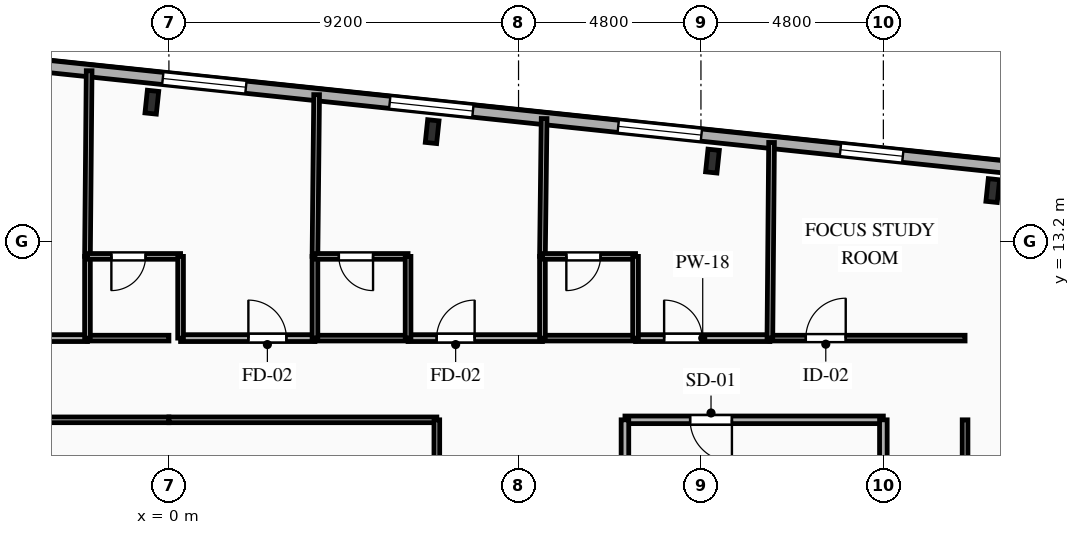
"""IFC4 building model, lengths in metres.
Left out: names, types, materials, properties, quantities, classifications, styles, units other than length and angle.
Written with IfcOpenShell. Run it as: python <this file> out.ifc"""

import sys

from ifc_helpers import new_model, si_unit, direction, frame, frame_2d, origin, origin_2d, place, context, subcontext, project, spatial, rectangle, i_section, extrude, element, fill, save


model = new_model("IFC4")
c1 = context("Model", 3, precision=1e-05, world=origin(), true_north=direction((0.0, 1.0)))
c2 = subcontext(c1, "Body", "Model", "MODEL_VIEW")
j1 = project(units=[si_unit("LENGTHUNIT", "METRE"), si_unit("PLANEANGLEUNIT", "RADIAN")], contexts=[c1])
p1 = place(None, origin())
s1 = spatial("IfcSite", under=j1, at=p1, CompositionType="ELEMENT")
p2 = place(p1, origin())
s2 = spatial("IfcBuilding", under=s1, at=p2, CompositionType="ELEMENT")
p3 = place(p2, frame((0.0, 0.0, 189.7)))
s3 = spatial("IfcBuildingStorey", under=s2, at=p3, CompositionType="ELEMENT", Elevation=189.7)
for number, where, z_axis, x_axis in (
    (1, (21.679, 14.532, 0.0), (0.0, 0.0, 1.0), (0.995, -0.105, 0.0)),
    (2, (14.303, 15.308, 0.0), (0.0, 0.0, 1.0), (0.995, -0.105, 0.0)),
    (3, (6.927, 16.083, 0.0), (0.0, 0.0, 1.0), (0.995, -0.105, 0.0)),
    (4, (-0.449, 16.858, 0.0), (0.0, 0.0, 1.0), (0.995, -0.105, 0.0)),
):
    element("IfcColumn", number, at=place(p3, frame(where, z_axis=z_axis, x_axis=x_axis)), inside=s3, PredefinedType="COLUMN", context=c2, shape_type="SweptSolid", body=[
        extrude(i_section(OverallWidth=0.3, OverallDepth=0.6, WebThickness=0.015, FlangeThickness=0.03, FilletRadius=0.027, at=origin_2d()), origin(), (0.0, 0.0, 1.0), 3.35),
    ])
p4 = place(p3, frame((-23.156, 19.898, 0.0), z_axis=(0.0, 0.0, 1.0), x_axis=(0.994522001802, -0.104527450613, 0.0)))
e5 = element("IfcWall", 5, at=p4, inside=s3, PredefinedType="SOLIDWALL", context=c2, shape_type="SweptSolid", body=[
    extrude(rectangle(XDim=45.8, YDim=0.32, at=frame_2d((22.9, 0.0))), origin(), (0.0, 0.0, 1.0), 3.04),
])
p5 = place(p4, frame((4.94, 0.0, 0.85)))
e6 = element("IfcOpeningElement", 6, at=p5, cuts=e5, PredefinedType="OPENING", context=c2, shape_type="SweptSolid", body=[
    extrude(rectangle(XDim=1.65, YDim=1.85, at=frame_2d((0.825, 0.925))), frame((0.0, 0.17, 0.0), z_axis=(0.0, -1.0, 0.0), x_axis=(1.0, 0.0, 0.0)), (0.0, 0.0, 1.0), 0.34),
])
p6 = place(p4, frame((12.572, 0.0, 0.85)))
e7 = element("IfcOpeningElement", 7, at=p6, cuts=e5, PredefinedType="OPENING", context=c2, shape_type="SweptSolid", body=[
    extrude(rectangle(XDim=1.6, YDim=1.85, at=frame_2d((0.8, 0.925))), frame((0.0, 0.17, 0.0), z_axis=(0.0, -1.0, 0.0), x_axis=(1.0, 0.0, 0.0)), (0.0, 0.0, 1.0), 0.34),
])
p7 = place(p4, frame((17.116, 0.0, 0.85)))
e8 = element("IfcOpeningElement", 8, at=p7, cuts=e5, PredefinedType="OPENING", context=c2, shape_type="SweptSolid", body=[
    extrude(rectangle(XDim=2.2, YDim=1.85, at=frame_2d((1.1, 0.925))), frame((0.0, 0.17, 0.0), z_axis=(0.0, -1.0, 0.0), x_axis=(1.0, 0.0, 0.0)), (0.0, 0.0, 1.0), 0.34),
])
p8 = place(p4, frame((23.121, 0.0, 0.85)))
e9 = element("IfcOpeningElement", 9, at=p8, cuts=e5, PredefinedType="OPENING", context=c2, shape_type="SweptSolid", body=[
    extrude(rectangle(XDim=2.2, YDim=1.85, at=frame_2d((1.1, 0.925))), frame((0.0, 0.17, 0.0), z_axis=(0.0, -1.0, 0.0), x_axis=(1.0, 0.0, 0.0)), (0.0, 0.0, 1.0), 0.34),
])
p9 = place(p4, frame((29.126, 0.0, 0.85)))
e10 = element("IfcOpeningElement", 10, at=p9, cuts=e5, PredefinedType="OPENING", context=c2, shape_type="SweptSolid", body=[
    extrude(rectangle(XDim=2.2, YDim=1.85, at=frame_2d((1.1, 0.925))), frame((0.0, 0.17, 0.0), z_axis=(0.0, -1.0, 0.0), x_axis=(1.0, 0.0, 0.0)), (0.0, 0.0, 1.0), 0.34),
])
p10 = place(p4, frame((35.172, 0.0, 0.85)))
e11 = element("IfcOpeningElement", 11, at=p10, cuts=e5, PredefinedType="OPENING", context=c2, shape_type="SweptSolid", body=[
    extrude(rectangle(XDim=2.2, YDim=1.85, at=frame_2d((1.1, 0.925))), frame((0.0, 0.17, 0.0), z_axis=(0.0, -1.0, 0.0), x_axis=(1.0, 0.0, 0.0)), (0.0, 0.0, 1.0), 0.34),
])
p11 = place(p4, frame((41.052, 0.0, 0.85)))
e12 = element("IfcOpeningElement", 12, at=p11, cuts=e5, PredefinedType="OPENING", context=c2, shape_type="SweptSolid", body=[
    extrude(rectangle(XDim=1.65, YDim=1.85, at=frame_2d((0.825, 0.925))), frame((0.0, 0.17, 0.0), z_axis=(0.0, -1.0, 0.0), x_axis=(1.0, 0.0, 0.0)), (0.0, 0.0, 1.0), 0.34),
])
p12 = place(p3, frame((18.8, 8.5, 0.0), z_axis=(0.0, 0.0, 1.0), x_axis=(-1.0, 0.0, 0.0)))
e13 = element("IfcWall", 13, at=p12, inside=s3, PredefinedType="PARTITIONING", context=c2, shape_type="SweptSolid", body=[
    extrude(rectangle(XDim=6.8, YDim=0.2, at=frame_2d((3.4, 0.0))), origin(), (0.0, 0.0, 1.0), 3.04),
])
p13 = place(p12, frame((3.985, 0.0, 0.0)))
e14 = element("IfcOpeningElement", 14, at=p13, cuts=e13, PredefinedType="OPENING", context=c2, shape_type="SweptSolid", body=[
    extrude(rectangle(XDim=1.1, YDim=2.15, at=frame_2d((0.55, 1.075))), frame((0.0, 0.11, 0.0), z_axis=(0.0, -1.0, 0.0), x_axis=(1.0, 0.0, 0.0)), (0.0, 0.0, 1.0), 0.22),
])
p14 = place(p3, frame((18.8, 5.6, 0.0), z_axis=(0.0, 0.0, 1.0), x_axis=(0.0, 1.0, 0.0)))
e15 = element("IfcWall", 15, at=p14, inside=s3, PredefinedType="PARTITIONING", context=c2, shape_type="SweptSolid", body=[
    extrude(rectangle(XDim=2.9, YDim=0.2, at=frame_2d((1.45, 0.0))), origin(), (0.0, 0.0, 1.0), 2.665),
])
p15 = place(p3, frame((12.0, 8.5, 0.0), z_axis=(0.0, 0.0, 1.0), x_axis=(0.0, -1.0, 0.0)))
e16 = element("IfcWall", 16, at=p15, inside=s3, PredefinedType="PARTITIONING", context=c2, shape_type="SweptSolid", body=[
    extrude(rectangle(XDim=2.9, YDim=0.2, at=frame_2d((1.45, 0.0))), origin(), (0.0, 0.0, 1.0), 3.04),
])
p16 = place(p3, frame((-5.679, 10.65, 0.0), z_axis=(0.0, 0.0, 1.0), x_axis=(1.0, 0.0, 0.0)))
e17 = element("IfcWall", 17, at=p16, inside=s3, PredefinedType="PARTITIONING", context=c2, shape_type="SweptSolid", body=[
    extrude(rectangle(XDim=3.536, YDim=0.18, at=frame_2d((1.768, 0.0))), origin(), (0.0, 0.0, 1.0), 3.04),
])
p17 = place(p16, frame((1.268, 0.0, 0.0)))
e18 = element("IfcOpeningElement", 18, at=p17, cuts=e17, PredefinedType="OPENING", context=c2, shape_type="SweptSolid", body=[
    extrude(rectangle(XDim=1.0, YDim=2.15, at=frame_2d((0.5, 1.075))), frame((0.0, 0.1, 0.0), z_axis=(0.0, -1.0, 0.0), x_axis=(1.0, 0.0, 0.0)), (0.0, 0.0, 1.0), 0.2),
])
p18 = place(p3, frame((-2.143, 10.65, 0.0), z_axis=(0.0, 0.0, 1.0), x_axis=(1.0, 0.0, 0.0)))
e19 = element("IfcWall", 19, at=p18, inside=s3, PredefinedType="PLUMBINGWALL", context=c2, shape_type="SweptSolid", body=[
    extrude(rectangle(XDim=2.143, YDim=0.15, at=frame_2d((1.072, 0.0))), origin(), (0.0, 0.0, 1.0), 3.04),
])
p19 = place(p3, frame((0.0, 8.5, 0.0), z_axis=(0.0, 0.0, 1.0), x_axis=(-1.0, 0.0, 0.0)))
e20 = element("IfcWall", 20, at=p19, inside=s3, PredefinedType="PARTITIONING", context=c2, shape_type="SweptSolid", body=[
    extrude(rectangle(XDim=7.05, YDim=0.15, at=frame_2d((3.525, 0.0))), origin(), (0.0, 0.0, 1.0), 3.04),
])
p20 = place(p3, frame((0.307, 10.65, 0.0), z_axis=(0.0, 0.0, 1.0), x_axis=(1.0, 0.0, 0.0)))
e21 = element("IfcWall", 21, at=p20, inside=s3, PredefinedType="PARTITIONING", context=c2, shape_type="SweptSolid", body=[
    extrude(rectangle(XDim=3.536, YDim=0.18, at=frame_2d((1.768, 0.0))), origin(), (0.0, 0.0, 1.0), 3.04),
])
p21 = place(p20, frame((1.784, 0.0, 0.0)))
e22 = element("IfcOpeningElement", 22, at=p21, cuts=e21, PredefinedType="OPENING", context=c2, shape_type="SweptSolid", body=[
    extrude(rectangle(XDim=1.0, YDim=2.15, at=frame_2d((0.5, 1.075))), frame((0.0, 0.1, 0.0), z_axis=(0.0, -1.0, 0.0), x_axis=(1.0, 0.0, 0.0)), (0.0, 0.0, 1.0), 0.2),
])
p22 = place(p3, frame((6.293, 10.65, 0.0), z_axis=(0.0, 0.0, 1.0), x_axis=(1.0, 0.0, 0.0)))
e23 = element("IfcWall", 23, at=p22, inside=s3, PredefinedType="PARTITIONING", context=c2, shape_type="SweptSolid", body=[
    extrude(rectangle(XDim=3.536, YDim=0.18, at=frame_2d((1.768, 0.0))), origin(), (0.0, 0.0, 1.0), 3.04),
])
p23 = place(p22, frame((0.752, 0.0, 0.0)))
e24 = element("IfcOpeningElement", 24, at=p23, cuts=e23, PredefinedType="OPENING", context=c2, shape_type="SweptSolid", body=[
    extrude(rectangle(XDim=1.0, YDim=2.15, at=frame_2d((0.5, 1.075))), frame((0.0, 0.1, 0.0), z_axis=(0.0, -1.0, 0.0), x_axis=(1.0, 0.0, 0.0)), (0.0, 0.0, 1.0), 0.2),
])
p24 = place(p3, frame((3.843, 10.65, 0.0), z_axis=(0.0, 0.0, 1.0), x_axis=(1.0, 0.0, 0.0)))
e25 = element("IfcWall", 25, at=p24, inside=s3, PredefinedType="PLUMBINGWALL", context=c2, shape_type="SweptSolid", body=[
    extrude(rectangle(XDim=2.45, YDim=0.15, at=frame_2d((1.225, 0.0))), origin(), (0.0, 0.0, 1.0), 3.04),
])
p25 = place(p3, frame((12.279, 10.65, 0.0), z_axis=(0.0, 0.0, 1.0), x_axis=(1.0, 0.0, 0.0)))
e26 = element("IfcWall", 26, at=p25, inside=s3, PredefinedType="PARTITIONING", context=c2, shape_type="SweptSolid", body=[
    extrude(rectangle(XDim=3.535, YDim=0.18, at=frame_2d((1.768, 0.0))), origin(), (0.0, 0.0, 1.0), 3.04),
])
p26 = place(p25, frame((0.752, 0.0, 0.0)))
e27 = element("IfcOpeningElement", 27, at=p26, cuts=e26, PredefinedType="OPENING", context=c2, shape_type="SweptSolid", body=[
    extrude(rectangle(XDim=1.0, YDim=2.15, at=frame_2d((0.5, 1.075))), frame((0.0, 0.1, 0.0), z_axis=(0.0, -1.0, 0.0), x_axis=(1.0, 0.0, 0.0)), (0.0, 0.0, 1.0), 0.2),
])
p27 = place(p3, frame((9.829, 10.65, 0.0), z_axis=(0.0, 0.0, 1.0), x_axis=(1.0, 0.0, 0.0)))
e28 = element("IfcWall", 28, at=p27, inside=s3, PredefinedType="PLUMBINGWALL", context=c2, shape_type="SweptSolid", body=[
    extrude(rectangle(XDim=2.45, YDim=0.15, at=frame_2d((1.225, 0.0))), origin(), (0.0, 0.0, 1.0), 3.04),
])
p28 = place(p3, frame((15.814, 10.65, 0.0), z_axis=(0.0, 0.0, 1.0), x_axis=(1.0, 0.0, 0.0)))
e29 = element("IfcWall", 29, at=p28, inside=s3, PredefinedType="PARTITIONING", context=c2, shape_type="SweptSolid", body=[
    extrude(rectangle(XDim=5.136, YDim=0.15, at=frame_2d((2.568, 0.0))), origin(), (0.0, 0.0, 1.0), 3.04),
])
p29 = place(p28, frame((0.946, 0.0, 0.0)))
e30 = element("IfcOpeningElement", 30, at=p29, cuts=e29, PredefinedType="OPENING", context=c2, shape_type="SweptSolid", body=[
    extrude(rectangle(XDim=1.05, YDim=2.15, at=frame_2d((0.525, 1.075))), frame((0.0, 0.085, 0.0), z_axis=(0.0, -1.0, 0.0), x_axis=(1.0, 0.0, 0.0)), (0.0, 0.0, 1.0), 0.17),
])
p30 = place(p3, frame((7.05, 8.5, 0.0), z_axis=(0.0, 0.0, 1.0), x_axis=(-1.0, 0.0, 0.0)))
e31 = element("IfcWall", 31, at=p30, inside=s3, PredefinedType="PARTITIONING", context=c2, shape_type="SweptSolid", body=[
    extrude(rectangle(XDim=7.05, YDim=0.15, at=frame_2d((3.525, 0.0))), origin(), (0.0, 0.0, 1.0), 3.04),
])
p31 = place(p3, frame((20.95, 8.5, 0.0), z_axis=(0.0, 0.0, 1.0), x_axis=(0.0, -1.0, 0.0)))
e32 = element("IfcWall", 32, at=p31, inside=s3, PredefinedType="PARTITIONING", context=c2, shape_type="SweptSolid", body=[
    extrude(rectangle(XDim=14.1, YDim=0.15, at=frame_2d((7.05, 0.0))), origin(), (0.0, 0.0, 1.0), 2.695),
])
p32 = place(p31, frame((9.498, 0.0, 0.0)))
e33 = element("IfcOpeningElement", 33, at=p32, cuts=e32, PredefinedType="OPENING", context=c2, shape_type="SweptSolid", body=[
    extrude(rectangle(XDim=1.05, YDim=2.15, at=frame_2d((0.525, 1.075))), frame((0.0, 0.085, 0.0), z_axis=(0.0, -1.0, 0.0), x_axis=(1.0, 0.0, 0.0)), (0.0, 0.0, 1.0), 0.17),
])
p33 = place(p3, frame((7.05, -0.8, 0.0), z_axis=(0.0, 0.0, 1.0), x_axis=(0.0, 1.0, 0.0)))
e34 = element("IfcWall", 34, at=p33, inside=s3, PredefinedType="PARTITIONING", context=c2, shape_type="SweptSolid", body=[
    extrude(rectangle(XDim=9.3, YDim=0.15, at=frame_2d((4.65, 0.0))), origin(), (0.0, 0.0, 1.0), 3.04),
])
p34 = place(p3, frame((-2.099, 17.685, 0.0), z_axis=(0.0, 0.0, 1.0), x_axis=(-0.008995138317, -0.999959542925, 0.0)))
e35 = element("IfcWall", 35, at=p34, inside=s3, PredefinedType="PARTITIONING", context=c2, shape_type="SweptSolid", body=[
    extrude(rectangle(XDim=4.885, YDim=0.15, at=frame_2d((2.443, 0.0))), origin(), (0.0, 0.0, 1.0), 3.04),
])
p35 = place(p3, frame((-2.143, 12.8, 0.0), z_axis=(0.0, 0.0, 1.0), x_axis=(0.0, -1.0, 0.0)))
e36 = element("IfcWall", 36, at=p35, inside=s3, PredefinedType="PLUMBINGWALL", context=c2, shape_type="SweptSolid", body=[
    extrude(rectangle(XDim=2.15, YDim=0.15, at=frame_2d((1.075, 0.0))), origin(), (0.0, 0.0, 1.0), 3.04),
])
p36 = place(p3, frame((0.307, 12.8, 0.0), z_axis=(0.0, 0.0, 1.0), x_axis=(-1.0, 0.0, 0.0)))
e37 = element("IfcWall", 37, at=p36, inside=s3, PredefinedType="PLUMBINGWALL", context=c2, shape_type="SweptSolid", body=[
    extrude(rectangle(XDim=2.45, YDim=0.15, at=frame_2d((1.225, 0.0))), origin(), (0.0, 0.0, 1.0), 3.04),
])
p37 = place(p36, frame((0.921, 0.0, 0.0)))
e38 = element("IfcOpeningElement", 38, at=p37, cuts=e37, PredefinedType="OPENING", context=c2, shape_type="SweptSolid", body=[
    extrude(rectangle(XDim=0.9, YDim=2.1, at=frame_2d((0.45, 1.05))), frame((0.0, 0.085, 0.0), z_axis=(0.0, -1.0, 0.0), x_axis=(1.0, 0.0, 0.0)), (0.0, 0.0, 1.0), 0.17),
])
p38 = place(p3, frame((0.307, 10.65, 0.0), z_axis=(0.0, 0.0, 1.0), x_axis=(0.0, 1.0, 0.0)))
e39 = element("IfcWall", 39, at=p38, inside=s3, PredefinedType="PLUMBINGWALL", context=c2, shape_type="SweptSolid", body=[
    extrude(rectangle(XDim=2.15, YDim=0.15, at=frame_2d((1.075, 0.0))), origin(), (0.0, 0.0, 1.0), 3.04),
])
p39 = place(p3, frame((3.887, 17.056, 0.0), z_axis=(0.0, 0.0, 1.0), x_axis=(-0.010324694878, -0.999946698917, 0.0)))
e40 = element("IfcWall", 40, at=p39, inside=s3, PredefinedType="PARTITIONING", context=c2, shape_type="SweptSolid", body=[
    extrude(rectangle(XDim=4.256, YDim=0.15, at=frame_2d((2.128, 0.0))), origin(), (0.0, 0.0, 1.0), 3.04),
])
p40 = place(p3, frame((3.843, 12.8, 0.0), z_axis=(0.0, 0.0, 1.0), x_axis=(0.0, -1.0, 0.0)))
e41 = element("IfcWall", 41, at=p40, inside=s3, PredefinedType="PLUMBINGWALL", context=c2, shape_type="SweptSolid", body=[
    extrude(rectangle(XDim=2.15, YDim=0.15, at=frame_2d((1.075, 0.0))), origin(), (0.0, 0.0, 1.0), 3.04),
])
p41 = place(p3, frame((6.293, 12.8, 0.0), z_axis=(0.0, 0.0, 1.0), x_axis=(-1.0, 0.0, 0.0)))
e42 = element("IfcWall", 42, at=p41, inside=s3, PredefinedType="PLUMBINGWALL", context=c2, shape_type="SweptSolid", body=[
    extrude(rectangle(XDim=2.45, YDim=0.15, at=frame_2d((1.225, 0.0))), origin(), (0.0, 0.0, 1.0), 3.04),
])
p42 = place(p41, frame((0.921, 0.0, 0.0)))
e43 = element("IfcOpeningElement", 43, at=p42, cuts=e42, PredefinedType="OPENING", context=c2, shape_type="SweptSolid", body=[
    extrude(rectangle(XDim=0.9, YDim=2.1, at=frame_2d((0.45, 1.05))), frame((0.0, 0.085, 0.0), z_axis=(0.0, -1.0, 0.0), x_axis=(1.0, 0.0, 0.0)), (0.0, 0.0, 1.0), 0.17),
])
p43 = place(p3, frame((6.293, 10.65, 0.0), z_axis=(0.0, 0.0, 1.0), x_axis=(0.0, 1.0, 0.0)))
e44 = element("IfcWall", 44, at=p43, inside=s3, PredefinedType="PLUMBINGWALL", context=c2, shape_type="SweptSolid", body=[
    extrude(rectangle(XDim=2.15, YDim=0.15, at=frame_2d((1.075, 0.0))), origin(), (0.0, 0.0, 1.0), 3.04),
])
p44 = place(p3, frame((9.873, 16.427, 0.0), z_axis=(0.0, 0.0, 1.0), x_axis=(-0.012048129237, -0.999927418657, 0.0)))
e45 = element("IfcWall", 45, at=p44, inside=s3, PredefinedType="PARTITIONING", context=c2, shape_type="SweptSolid", body=[
    extrude(rectangle(XDim=3.627, YDim=0.15, at=frame_2d((1.813, 0.0))), origin(), (0.0, 0.0, 1.0), 3.04),
])
p45 = place(p3, frame((9.829, 12.8, 0.0), z_axis=(0.0, 0.0, 1.0), x_axis=(0.0, -1.0, 0.0)))
e46 = element("IfcWall", 46, at=p45, inside=s3, PredefinedType="PLUMBINGWALL", context=c2, shape_type="SweptSolid", body=[
    extrude(rectangle(XDim=2.15, YDim=0.15, at=frame_2d((1.075, 0.0))), origin(), (0.0, 0.0, 1.0), 3.04),
])
p46 = place(p3, frame((12.279, 12.8, 0.0), z_axis=(0.0, 0.0, 1.0), x_axis=(-1.0, 0.0, 0.0)))
e47 = element("IfcWall", 47, at=p46, inside=s3, PredefinedType="PLUMBINGWALL", context=c2, shape_type="SweptSolid", body=[
    extrude(rectangle(XDim=2.45, YDim=0.15, at=frame_2d((1.225, 0.0))), origin(), (0.0, 0.0, 1.0), 3.04),
])
p47 = place(p46, frame((0.921, 0.0, 0.0)))
e48 = element("IfcOpeningElement", 48, at=p47, cuts=e47, PredefinedType="OPENING", context=c2, shape_type="SweptSolid", body=[
    extrude(rectangle(XDim=0.9, YDim=2.1, at=frame_2d((0.45, 1.05))), frame((0.0, 0.085, 0.0), z_axis=(0.0, -1.0, 0.0), x_axis=(1.0, 0.0, 0.0)), (0.0, 0.0, 1.0), 0.17),
])
p48 = place(p3, frame((12.279, 10.65, 0.0), z_axis=(0.0, 0.0, 1.0), x_axis=(0.0, 1.0, 0.0)))
e49 = element("IfcWall", 49, at=p48, inside=s3, PredefinedType="PLUMBINGWALL", context=c2, shape_type="SweptSolid", body=[
    extrude(rectangle(XDim=2.15, YDim=0.15, at=frame_2d((1.075, 0.0))), origin(), (0.0, 0.0, 1.0), 3.04),
])
p49 = place(p3, frame((15.858, 15.798, 0.0), z_axis=(0.0, 0.0, 1.0), x_axis=(-0.008536158681, -0.999963566334, 0.0)))
e50 = element("IfcWall", 50, at=p49, inside=s3, PredefinedType="PARTITIONING", context=c2, shape_type="SweptSolid", body=[
    extrude(rectangle(XDim=5.148, YDim=0.15, at=frame_2d((2.574, 0.0))), origin(), (0.0, 0.0, 1.0), 3.04),
])
p50 = place(p8, origin())
e51 = element("IfcWindow", 51, at=p50, inside=s3, PartitioningType="SINGLE_PANEL", PredefinedType="WINDOW", context=c2, shape_type="SweptSolid", body=[
    extrude(rectangle(XDim=2.2, YDim=1.85, at=frame_2d((1.1, 0.925))), frame((0.0, 0.03, 0.0), z_axis=(0.0, -1.0, 0.0), x_axis=(1.0, 0.0, 0.0)), (0.0, 0.0, 1.0), 0.06),
])
fill(e9, e51)
p51 = place(p9, origin())
e52 = element("IfcWindow", 52, at=p51, inside=s3, PartitioningType="SINGLE_PANEL", PredefinedType="WINDOW", context=c2, shape_type="SweptSolid", body=[
    extrude(rectangle(XDim=2.2, YDim=1.85, at=frame_2d((1.1, 0.925))), frame((0.0, 0.03, 0.0), z_axis=(0.0, -1.0, 0.0), x_axis=(1.0, 0.0, 0.0)), (0.0, 0.0, 1.0), 0.06),
])
fill(e10, e52)
p52 = place(p10, origin())
e53 = element("IfcWindow", 53, at=p52, inside=s3, PartitioningType="SINGLE_PANEL", PredefinedType="WINDOW", context=c2, shape_type="SweptSolid", body=[
    extrude(rectangle(XDim=2.2, YDim=1.85, at=frame_2d((1.1, 0.925))), frame((0.0, 0.03, 0.0), z_axis=(0.0, -1.0, 0.0), x_axis=(1.0, 0.0, 0.0)), (0.0, 0.0, 1.0), 0.06),
])
fill(e11, e53)
p53 = place(p11, origin())
e54 = element("IfcWindow", 54, at=p53, inside=s3, PartitioningType="SINGLE_PANEL", PredefinedType="WINDOW", context=c2, shape_type="SweptSolid", body=[
    extrude(rectangle(XDim=1.65, YDim=1.85, at=frame_2d((0.825, 0.925))), frame((0.0, 0.03, 0.0), z_axis=(0.0, -1.0, 0.0), x_axis=(1.0, 0.0, 0.0)), (0.0, 0.0, 1.0), 0.06),
])
fill(e12, e54)
p54 = place(p13, origin())
e55 = element("IfcDoor", 55, at=p54, inside=s3, OperationType="SINGLE_SWING_LEFT", PredefinedType="DOOR", context=c2, shape_type="SweptSolid", body=[
    extrude(rectangle(XDim=1.1, YDim=2.15, at=frame_2d((0.55, 1.075))), frame((0.0, 0.025, 0.0), z_axis=(0.0, -1.0, 0.0), x_axis=(1.0, 0.0, 0.0)), (0.0, 0.0, 1.0), 0.05),
])
fill(e14, e55)
p55 = place(p21, origin())
e56 = element("IfcDoor", 56, at=p55, inside=s3, OperationType="SINGLE_SWING_LEFT", PredefinedType="DOOR", context=c2, shape_type="SweptSolid", body=[
    extrude(rectangle(XDim=1.0, YDim=2.15, at=frame_2d((0.5, 1.075))), frame((0.0, 0.025, 0.0), z_axis=(0.0, -1.0, 0.0), x_axis=(1.0, 0.0, 0.0)), (0.0, 0.0, 1.0), 0.05),
])
fill(e22, e56)
p56 = place(p23, origin())
e57 = element("IfcDoor", 57, at=p56, inside=s3, OperationType="SINGLE_SWING_RIGHT", PredefinedType="DOOR", context=c2, shape_type="SweptSolid", body=[
    extrude(rectangle(XDim=1.0, YDim=2.15, at=frame_2d((0.5, 1.075))), frame((0.0, 0.025, 0.0), z_axis=(0.0, -1.0, 0.0), x_axis=(1.0, 0.0, 0.0)), (0.0, 0.0, 1.0), 0.05),
])
fill(e24, e57)
p57 = place(p26, origin())
e58 = element("IfcDoor", 58, at=p57, inside=s3, OperationType="SINGLE_SWING_LEFT", PredefinedType="DOOR", context=c2, shape_type="SweptSolid", body=[
    extrude(rectangle(XDim=1.0, YDim=2.15, at=frame_2d((0.5, 1.075))), frame((0.0, 0.025, 0.0), z_axis=(0.0, -1.0, 0.0), x_axis=(1.0, 0.0, 0.0)), (0.0, 0.0, 1.0), 0.05),
])
fill(e27, e58)
p58 = place(p29, origin())
e59 = element("IfcDoor", 59, at=p58, inside=s3, OperationType="SINGLE_SWING_RIGHT", PredefinedType="DOOR", context=c2, shape_type="SweptSolid", body=[
    extrude(rectangle(XDim=1.05, YDim=2.15, at=frame_2d((0.525, 1.075))), frame((0.0, 0.025, 0.0), z_axis=(0.0, -1.0, 0.0), x_axis=(1.0, 0.0, 0.0)), (0.0, 0.0, 1.0), 0.05),
])
fill(e30, e59)
p59 = place(p37, origin())
e60 = element("IfcDoor", 60, at=p59, inside=s3, OperationType="SINGLE_SWING_RIGHT", PredefinedType="DOOR", context=c2, shape_type="SweptSolid", body=[
    extrude(rectangle(XDim=0.9, YDim=2.1, at=frame_2d((0.45, 1.05))), frame((0.0, 0.025, 0.0), z_axis=(0.0, -1.0, 0.0), x_axis=(1.0, 0.0, 0.0)), (0.0, 0.0, 1.0), 0.05),
])
fill(e38, e60)
p60 = place(p42, origin())
e61 = element("IfcDoor", 61, at=p60, inside=s3, OperationType="SINGLE_SWING_LEFT", PredefinedType="DOOR", context=c2, shape_type="SweptSolid", body=[
    extrude(rectangle(XDim=0.9, YDim=2.1, at=frame_2d((0.45, 1.05))), frame((0.0, 0.025, 0.0), z_axis=(0.0, -1.0, 0.0), x_axis=(1.0, 0.0, 0.0)), (0.0, 0.0, 1.0), 0.05),
])
fill(e43, e61)
p61 = place(p47, origin())
e62 = element("IfcDoor", 62, at=p61, inside=s3, OperationType="SINGLE_SWING_RIGHT", PredefinedType="DOOR", context=c2, shape_type="SweptSolid", body=[
    extrude(rectangle(XDim=0.9, YDim=2.1, at=frame_2d((0.45, 1.05))), frame((0.0, 0.025, 0.0), z_axis=(0.0, -1.0, 0.0), x_axis=(1.0, 0.0, 0.0)), (0.0, 0.0, 1.0), 0.05),
])
fill(e48, e62)
save(model, sys.argv[1])
